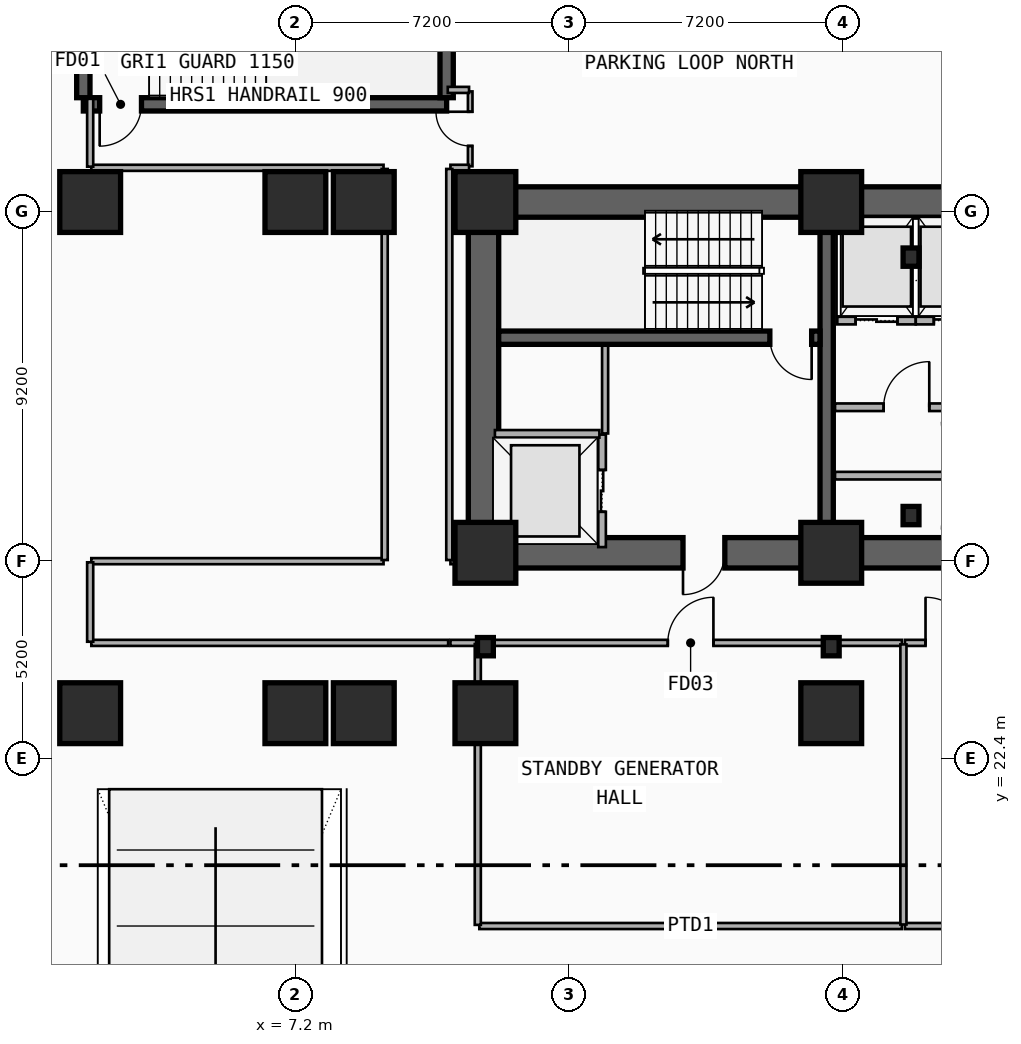
"""IFC4 building model, lengths in metres.
Left out: names, types, materials, properties, quantities, classifications, styles, units other than length and angle.
Written with IfcOpenShell. Run it as: python <this file> out.ifc"""

import sys

from ifc_helpers import new_model, si_unit, direction, frame, frame_2d, origin, origin_2d, place, context, subcontext, project, spatial, rectangle, i_section, extrude, element, fill, save


model = new_model("IFC4")
c1 = context("Model", 3, precision=1e-05, world=origin(), true_north=direction((0.0, 1.0)))
c2 = subcontext(c1, "Body", "Model", "MODEL_VIEW")
j1 = project(units=[si_unit("LENGTHUNIT", "METRE"), si_unit("PLANEANGLEUNIT", "RADIAN")], contexts=[c1])
p1 = place(None, origin())
s1 = spatial("IfcSite", under=j1, at=p1, CompositionType="ELEMENT")
p2 = place(p1, origin())
s2 = spatial("IfcBuilding", under=s1, at=p2, CompositionType="ELEMENT")
p3 = place(p2, frame((0.0, 0.0, -8.8)))
s3 = spatial("IfcBuildingStorey", under=s2, at=p3, CompositionType="ELEMENT", Elevation=-8.8)
p4 = place(p3, frame((12.15, 37.05, 0.0), z_axis=(0.0, 0.0, 1.0), x_axis=(1.0, 0.0, 0.0)))
e1 = element("IfcWall", 1, at=p4, inside=s3, PredefinedType="SHEAR", context=c2, shape_type="SweptSolid", body=[
    extrude(rectangle(XDim=33.23, YDim=0.8, at=frame_2d((16.615, 0.0))), origin(), (0.0, 0.0, 1.0), 4.4),
])
p5 = place(p3, frame((21.18, 27.82, 0.0), z_axis=(0.0, 0.0, 1.0), x_axis=(-1.0, 0.0, 0.0)))
e2 = element("IfcWall", 2, at=p5, inside=s3, PredefinedType="SHEAR", context=c2, shape_type="SweptSolid", body=[
    extrude(rectangle(XDim=9.03, YDim=0.8, at=frame_2d((4.515, 0.0))), origin(), (0.0, 0.0, 1.0), 4.4),
])
p6 = place(p5, frame((2.68, 0.0, 0.0)))
e3 = element("IfcOpeningElement", 3, at=p6, cuts=e2, PredefinedType="OPENING", context=c2, shape_type="SweptSolid", body=[
    extrude(rectangle(XDim=1.1, YDim=2.15, at=frame_2d((0.55, 1.075))), frame((0.0, 0.41, 0.0), z_axis=(0.0, -1.0, 0.0), x_axis=(1.0, 0.0, 0.0)), (0.0, 0.0, 1.0), 0.82),
])
p7 = place(p3, frame((33.15, 27.82, 0.0), z_axis=(0.0, 0.0, 1.0), x_axis=(-1.0, 0.0, 0.0)))
e4 = element("IfcWall", 4, at=p7, inside=s3, PredefinedType="SHEAR", context=c2, shape_type="SweptSolid", body=[
    extrude(rectangle(XDim=11.97, YDim=0.8, at=frame_2d((5.985, 0.0))), origin(), (0.0, 0.0, 1.0), 4.4),
])
p8 = place(p7, frame((6.1, 0.0, 0.0)))
e5 = element("IfcOpeningElement", 5, at=p8, cuts=e4, PredefinedType="OPENING", context=c2, shape_type="SweptSolid", body=[
    extrude(rectangle(XDim=1.6, YDim=2.2, at=frame_2d((0.8, 1.1))), frame((0.0, 0.41, 0.0), z_axis=(0.0, -1.0, 0.0), x_axis=(1.0, 0.0, 0.0)), (0.0, 0.0, 1.0), 0.82),
])
p9 = place(p3, frame((12.15, 28.22, 0.0), z_axis=(0.0, 0.0, 1.0), x_axis=(0.0, 1.0, 0.0)))
e6 = element("IfcWall", 6, at=p9, inside=s3, PredefinedType="SHEAR", context=c2, shape_type="SweptSolid", body=[
    extrude(rectangle(XDim=8.43, YDim=0.8, at=frame_2d((4.215, 0.0))), origin(), (0.0, 0.0, 1.0), 4.4),
])
p10 = place(p3, frame((21.18, 28.22, 0.0), z_axis=(0.0, 0.0, 1.0), x_axis=(0.0, 1.0, 0.0)))
e7 = element("IfcWall", 7, at=p10, inside=s3, PredefinedType="SHEAR", context=c2, shape_type="SweptSolid", body=[
    extrude(rectangle(XDim=8.43, YDim=0.35, at=frame_2d((4.215, 0.0))), origin(), (0.0, 0.0, 1.0), 4.4),
])
p11 = place(p3, frame((21.005, 33.48, 0.0), z_axis=(0.0, 0.0, 1.0), x_axis=(-1.0, 0.0, 0.0)))
e8 = element("IfcWall", 8, at=p11, inside=s3, PredefinedType="SHEAR", context=c2, shape_type="SweptSolid", body=[
    extrude(rectangle(XDim=8.455, YDim=0.35, at=frame_2d((4.228, 0.0))), origin(), (0.0, 0.0, 1.0), 4.4),
])
p12 = place(p11, frame((0.22, 0.0, 0.0)))
e9 = element("IfcOpeningElement", 9, at=p12, cuts=e8, PredefinedType="OPENING", context=c2, shape_type="SweptSolid", body=[
    extrude(rectangle(XDim=1.1, YDim=2.15, at=frame_2d((0.55, 1.075))), frame((0.0, 0.185, 0.0), z_axis=(0.0, -1.0, 0.0), x_axis=(1.0, 0.0, 0.0)), (0.0, 0.0, 1.0), 0.37),
])
p13 = place(p3, frame((11.18, 39.62, 0.0), z_axis=(0.0, 0.0, 1.0), x_axis=(-1.0, 0.0, 0.0)))
e10 = element("IfcWall", 10, at=p13, inside=s3, PredefinedType="SHEAR", context=c2, shape_type="SweptSolid", body=[
    extrude(rectangle(XDim=9.56, YDim=0.35, at=frame_2d((4.78, 0.0))), origin(), (0.0, 0.0, 1.0), 4.4),
])
p14 = place(p13, frame((8.03, 0.0, 0.0)))
e11 = element("IfcOpeningElement", 11, at=p14, cuts=e10, PredefinedType="OPENING", context=c2, shape_type="SweptSolid", body=[
    extrude(rectangle(XDim=1.1, YDim=2.15, at=frame_2d((0.55, 1.075))), frame((0.0, 0.185, 0.0), z_axis=(0.0, -1.0, 0.0), x_axis=(1.0, 0.0, 0.0)), (0.0, 0.0, 1.0), 0.37),
])
for number, where, z_axis, x_axis in (
    (12, (1.62, 39.795, 0.0), (0.0, 0.0, 1.0), (0.0, 1.0, 0.0)),
    (13, (11.18, 39.795, 0.0), (0.0, 0.0, 1.0), (0.0, 1.0, 0.0)),
):
    element("IfcWall", number, at=place(p3, frame(where, z_axis=z_axis, x_axis=x_axis)), inside=s3, PredefinedType="SHEAR", context=c2, shape_type="SweptSolid", body=[
        extrude(rectangle(XDim=3.27, YDim=0.35, at=frame_2d((1.635, 0.0))), origin(), (0.0, 0.0, 1.0), 4.4),
    ])
for number, where, z_axis, x_axis in (
    (14, (23.4, 28.8, 0.0), (0.0, 0.0, 1.0), (1.0, 0.0, 0.0)),
    (15, (23.4, 35.6, 0.0), (0.0, 0.0, 1.0), (1.0, 0.0, 0.0)),
):
    element("IfcColumn", number, at=place(p3, frame(where, z_axis=z_axis, x_axis=x_axis)), inside=s3, PredefinedType="COLUMN", context=c2, shape_type="SweptSolid", body=[
        extrude(i_section(OverallWidth=0.418, OverallDepth=0.481, WebThickness=0.043, FlangeThickness=0.068, FilletRadius=0.015, at=origin_2d()), origin(), (0.0, 0.0, 1.0), 4.4),
    ])
for number, where, z_axis, x_axis in (
    (16, (12.2, 27.82, 0.0), (0.0, 0.0, 1.0), (1.0, 0.0, 0.0)),
    (17, (12.2, 37.05, 0.0), (0.0, 0.0, 1.0), (1.0, 0.0, 0.0)),
    (18, (21.3, 27.82, 0.0), (0.0, 0.0, 1.0), (1.0, 0.0, 0.0)),
    (19, (21.3, 37.05, 0.0), (0.0, 0.0, 1.0), (1.0, 0.0, 0.0)),
):
    element("IfcColumn", number, at=place(p3, frame(where, z_axis=z_axis, x_axis=x_axis)), inside=s3, PredefinedType="COLUMN", context=c2, shape_type="SweptSolid", body=[
        extrude(rectangle(XDim=1.6, YDim=1.6, at=origin_2d()), origin(), (0.0, 0.0, 1.0), 4.4),
    ])
for number, where, z_axis, x_axis in (
    (20, (12.2, 25.35, 0.0), (0.0, 0.0, 1.0), (1.0, 0.0, 0.0)),
    (21, (21.3, 25.35, 0.0), (0.0, 0.0, 1.0), (1.0, 0.0, 0.0)),
):
    element("IfcColumn", number, at=place(p3, frame(where, z_axis=z_axis, x_axis=x_axis)), inside=s3, PredefinedType="COLUMN", context=c2, shape_type="SweptSolid", body=[
        extrude(i_section(OverallWidth=0.418, OverallDepth=0.481, WebThickness=0.043, FlangeThickness=0.068, FilletRadius=0.015, at=origin_2d()), origin(), (0.0, 0.0, 1.0), 4.4),
    ])
for number, where, z_axis, x_axis in (
    (22, (1.8, 23.6, 0.0), (0.0, 0.0, 1.0), (1.0, 0.0, 0.0)),
    (23, (1.8, 37.05, 0.0), (0.0, 0.0, 1.0), (1.0, 0.0, 0.0)),
    (24, (7.2, 23.6, 0.0), (0.0, 0.0, 1.0), (1.0, 0.0, 0.0)),
    (25, (7.2, 37.05, 0.0), (0.0, 0.0, 1.0), (1.0, 0.0, 0.0)),
    (26, (9.0, 23.6, 0.0), (0.0, 0.0, 1.0), (1.0, 0.0, 0.0)),
    (27, (9.0, 37.05, 0.0), (0.0, 0.0, 1.0), (1.0, 0.0, 0.0)),
    (28, (12.2, 23.6, 0.0), (0.0, 0.0, 1.0), (1.0, 0.0, 0.0)),
    (29, (21.3, 23.6, 0.0), (0.0, 0.0, 1.0), (1.0, 0.0, 0.0)),
):
    element("IfcColumn", number, at=place(p3, frame(where, z_axis=z_axis, x_axis=x_axis)), inside=s3, PredefinedType="COLUMN", context=c2, shape_type="SweptSolid", body=[
        extrude(rectangle(XDim=1.6, YDim=1.6, at=origin_2d()), origin(), (0.0, 0.0, 1.0), 4.4),
    ])
p15 = place(p3, frame((15.27, 27.97, 0.0), z_axis=(0.0, 0.0, 1.0), x_axis=(0.0, 1.0, 0.0)))
e30 = element("IfcWall", 30, at=p15, inside=s3, PredefinedType="PARTITIONING", context=c2, shape_type="SweptSolid", body=[
    extrude(rectangle(XDim=2.96, YDim=0.2, at=frame_2d((1.48, 0.0))), origin(), (0.0, 0.0, 1.0), 3.052),
])
p16 = place(p15, frame((0.93, 0.0, 0.0)))
e31 = element("IfcOpeningElement", 31, at=p16, cuts=e30, PredefinedType="OPENING", context=c2, shape_type="SweptSolid", body=[
    extrude(rectangle(XDim=1.1, YDim=2.15, at=frame_2d((0.55, 1.075))), frame((0.0, 0.11, 0.0), z_axis=(0.0, -1.0, 0.0), x_axis=(1.0, 0.0, 0.0)), (0.0, 0.0, 1.0), 0.22),
])
p17 = place(p3, frame((12.45, 30.95, 0.0), z_axis=(0.0, 0.0, 1.0), x_axis=(1.0, 0.0, 0.0)))
e32 = element("IfcWall", 32, at=p17, inside=s3, PredefinedType="PARTITIONING", context=c2, shape_type="SweptSolid", body=[
    extrude(rectangle(XDim=2.75, YDim=0.2, at=frame_2d((1.375, 0.0))), origin(), (0.0, 0.0, 1.0), 3.052),
])
p18 = place(p3, frame((21.46, 33.93, 0.0), z_axis=(0.0, 0.0, 1.0), x_axis=(1.0, 0.0, 0.0)))
e33 = element("IfcWall", 33, at=p18, inside=s3, PredefinedType="PARTITIONING", context=c2, shape_type="SweptSolid", body=[
    extrude(rectangle(XDim=2.065, YDim=0.2, at=frame_2d((1.032, 0.0))), origin(), (0.0, 0.0, 1.0), 3.052),
])
p19 = place(p18, frame((0.482, 0.0, 0.0)))
e34 = element("IfcOpeningElement", 34, at=p19, cuts=e33, PredefinedType="OPENING", context=c2, shape_type="SweptSolid", body=[
    extrude(rectangle(XDim=1.1, YDim=2.15, at=frame_2d((0.55, 1.075))), frame((0.0, 0.11, 0.0), z_axis=(0.0, -1.0, 0.0), x_axis=(1.0, 0.0, 0.0)), (0.0, 0.0, 1.0), 0.22),
])
p20 = place(p3, frame((23.525, 33.93, 0.0), z_axis=(0.0, 0.0, 1.0), x_axis=(1.0, 0.0, 0.0)))
e35 = element("IfcWall", 35, at=p20, inside=s3, PredefinedType="PARTITIONING", context=c2, shape_type="SweptSolid", body=[
    extrude(rectangle(XDim=2.05, YDim=0.2, at=frame_2d((1.025, 0.0))), origin(), (0.0, 0.0, 1.0), 4.08),
])
p21 = place(p20, frame((0.475, 0.0, 0.0)))
e36 = element("IfcOpeningElement", 36, at=p21, cuts=e35, PredefinedType="OPENING", context=c2, shape_type="SweptSolid", body=[
    extrude(rectangle(XDim=1.1, YDim=2.15, at=frame_2d((0.55, 1.075))), frame((0.0, 0.11, 0.0), z_axis=(0.0, -1.0, 0.0), x_axis=(1.0, 0.0, 0.0)), (0.0, 0.0, 1.0), 0.22),
])
p22 = place(p3, frame((21.4, 31.65, 0.0), z_axis=(0.0, 0.0, 1.0), x_axis=(1.0, 0.0, 0.0)))
e37 = element("IfcWall", 37, at=p22, inside=s3, PredefinedType="PARTITIONING", context=c2, shape_type="SweptSolid", body=[
    extrude(rectangle(XDim=3.76, YDim=0.2, at=frame_2d((1.88, 0.0))), origin(), (0.0, 0.0, 1.0), 3.052),
])
p23 = place(p22, frame((1.28, 0.0, 0.0)))
e38 = element("IfcOpeningElement", 38, at=p23, cuts=e37, PredefinedType="OPENING", context=c2, shape_type="SweptSolid", body=[
    extrude(rectangle(XDim=1.2, YDim=2.15, at=frame_2d((0.6, 1.075))), frame((0.0, 0.11, 0.0), z_axis=(0.0, -1.0, 0.0), x_axis=(1.0, 0.0, 0.0)), (0.0, 0.0, 1.0), 0.22),
])
p24 = place(p3, frame((21.4, 29.85, 0.0), z_axis=(0.0, 0.0, 1.0), x_axis=(1.0, 0.0, 0.0)))
e39 = element("IfcWall", 39, at=p24, inside=s3, PredefinedType="PARTITIONING", context=c2, shape_type="SweptSolid", body=[
    extrude(rectangle(XDim=3.76, YDim=0.2, at=frame_2d((1.88, 0.0))), origin(), (0.0, 0.0, 1.0), 3.052),
])
p25 = place(p3, frame((12.04, 25.45, 0.0), z_axis=(0.0, 0.0, 1.0), x_axis=(1.0, 0.0, 0.0)))
e40 = element("IfcWall", 40, at=p25, inside=s3, PredefinedType="PARTITIONING", context=c2, shape_type="SweptSolid", body=[
    extrude(rectangle(XDim=11.12, YDim=0.16, at=frame_2d((5.56, 0.0))), origin(), (0.0, 0.0, 1.0), 3.246),
])
p26 = place(p25, frame((4.96, 0.0, 0.0)))
e41 = element("IfcOpeningElement", 41, at=p26, cuts=e40, PredefinedType="OPENING", context=c2, shape_type="SweptSolid", body=[
    extrude(rectangle(XDim=1.2, YDim=2.15, at=frame_2d((0.6, 1.075))), frame((0.0, 0.09, 0.0), z_axis=(0.0, -1.0, 0.0), x_axis=(1.0, 0.0, 0.0)), (0.0, 0.0, 1.0), 0.18),
])
p27 = place(p3, frame((23.24, 25.45, 0.0), z_axis=(0.0, 0.0, 1.0), x_axis=(1.0, 0.0, 0.0)))
e42 = element("IfcWall", 42, at=p27, inside=s3, PredefinedType="PARTITIONING", context=c2, shape_type="SweptSolid", body=[
    extrude(rectangle(XDim=11.12, YDim=0.16, at=frame_2d((5.56, 0.0))), origin(), (0.0, 0.0, 1.0), 4.08),
])
p28 = place(p27, frame((0.542, 0.0, 0.0)))
e43 = element("IfcOpeningElement", 43, at=p28, cuts=e42, PredefinedType="OPENING", context=c2, shape_type="SweptSolid", body=[
    extrude(rectangle(XDim=1.2, YDim=2.15, at=frame_2d((0.6, 1.075))), frame((0.0, 0.09, 0.0), z_axis=(0.0, -1.0, 0.0), x_axis=(1.0, 0.0, 0.0)), (0.0, 0.0, 1.0), 0.18),
])
p29 = place(p3, frame((12.04, 18.0, 0.0), z_axis=(0.0, 0.0, 1.0), x_axis=(1.0, 0.0, 0.0)))
e44 = element("IfcWall", 44, at=p29, inside=s3, PredefinedType="PARTITIONING", context=c2, shape_type="SweptSolid", body=[
    extrude(rectangle(XDim=11.12, YDim=0.16, at=frame_2d((5.56, 0.0))), origin(), (0.0, 0.0, 1.0), 3.246),
])
p30 = place(p3, frame((23.24, 18.0, 0.0), z_axis=(0.0, 0.0, 1.0), x_axis=(1.0, 0.0, 0.0)))
e45 = element("IfcWall", 45, at=p30, inside=s3, PredefinedType="PARTITIONING", context=c2, shape_type="SweptSolid", body=[
    extrude(rectangle(XDim=11.12, YDim=0.16, at=frame_2d((5.56, 0.0))), origin(), (0.0, 0.0, 1.0), 4.08),
])
p31 = place(p3, frame((11.8, 37.99, 0.0), z_axis=(0.0, 0.0, 1.0), x_axis=(0.0, 1.0, 0.0)))
e46 = element("IfcWall", 46, at=p31, inside=s3, PredefinedType="PARTITIONING", context=c2, shape_type="SweptSolid", body=[
    extrude(rectangle(XDim=1.97, YDim=0.12, at=frame_2d((0.985, 0.0))), origin(), (0.0, 0.0, 1.0), 3.41),
])
p32 = place(p31, frame((0.535, 0.0, 0.0)))
e47 = element("IfcOpeningElement", 47, at=p32, cuts=e46, PredefinedType="OPENING", context=c2, shape_type="SweptSolid", body=[
    extrude(rectangle(XDim=0.9, YDim=2.1, at=frame_2d((0.45, 1.05))), frame((0.0, 0.07, 0.0), z_axis=(0.0, -1.0, 0.0), x_axis=(1.0, 0.0, 0.0)), (0.0, 0.0, 1.0), 0.14),
])
p33 = place(p3, frame((23.2, 18.04, 0.0), z_axis=(0.0, 0.0, 1.0), x_axis=(0.0, 1.0, 0.0)))
e48 = element("IfcWall", 48, at=p33, inside=s3, PredefinedType="PARTITIONING", context=c2, shape_type="SweptSolid", body=[
    extrude(rectangle(XDim=7.37, YDim=0.16, at=frame_2d((3.685, 0.0))), origin(), (0.0, 0.0, 1.0), 2.66),
])
p34 = place(p3, frame((15.35, 30.96, 0.0), z_axis=(0.0, 0.0, 1.0), x_axis=(0.0, 1.0, 0.0)))
e49 = element("IfcWall", 49, at=p34, inside=s3, PredefinedType="PARTITIONING", context=c2, shape_type="SweptSolid", body=[
    extrude(rectangle(XDim=2.31, YDim=0.16, at=frame_2d((1.155, 0.0))), origin(), (0.0, 0.0, 1.0), 4.08),
])
p35 = place(p3, frame((11.28, 25.45, 0.0), z_axis=(0.0, 0.0, 1.0), x_axis=(1.0, 0.0, 0.0)))
e50 = element("IfcWall", 50, at=p35, inside=s3, PredefinedType="PARTITIONING", context=c2, shape_type="SweptSolid", body=[
    extrude(rectangle(XDim=0.69, YDim=0.16, at=frame_2d((0.345, 0.0))), origin(), (0.0, 0.0, 1.0), 3.246),
])
p36 = place(p3, frame((11.28, 27.6, 0.0), z_axis=(0.0, 0.0, 1.0), x_axis=(1.0, 0.0, 0.0)))
e51 = element("IfcWall", 51, at=p36, inside=s3, PredefinedType="PARTITIONING", context=c2, shape_type="SweptSolid", body=[
    extrude(rectangle(XDim=0.84, YDim=0.16, at=frame_2d((0.42, 0.0))), origin(), (0.0, 0.0, 1.0), 3.052),
])
p37 = place(p3, frame((1.83, 25.45, 0.0), z_axis=(0.0, 0.0, 1.0), x_axis=(1.0, 0.0, 0.0)))
e52 = element("IfcWall", 52, at=p37, inside=s3, PredefinedType="PARTITIONING", context=c2, shape_type="SweptSolid", body=[
    extrude(rectangle(XDim=9.39, YDim=0.16, at=frame_2d((4.695, 0.0))), origin(), (0.0, 0.0, 1.0), 4.08),
])
p38 = place(p3, frame((1.83, 27.6, 0.0), z_axis=(0.0, 0.0, 1.0), x_axis=(1.0, 0.0, 0.0)))
e53 = element("IfcWall", 53, at=p38, inside=s3, PredefinedType="PARTITIONING", context=c2, shape_type="SweptSolid", body=[
    extrude(rectangle(XDim=7.69, YDim=0.16, at=frame_2d((3.845, 0.0))), origin(), (0.0, 0.0, 1.0), 4.08),
])
p39 = place(p3, frame((1.8, 25.48, 0.0), z_axis=(0.0, 0.0, 1.0), x_axis=(0.0, 1.0, 0.0)))
e54 = element("IfcWall", 54, at=p39, inside=s3, PredefinedType="PARTITIONING", context=c2, shape_type="SweptSolid", body=[
    extrude(rectangle(XDim=2.09, YDim=0.16, at=frame_2d((1.045, 0.0))), origin(), (0.0, 0.0, 1.0), 4.08),
])
p40 = place(p3, frame((1.83, 37.95, 0.0), z_axis=(0.0, 0.0, 1.0), x_axis=(1.0, 0.0, 0.0)))
e55 = element("IfcWall", 55, at=p40, inside=s3, PredefinedType="PARTITIONING", context=c2, shape_type="SweptSolid", body=[
    extrude(rectangle(XDim=7.69, YDim=0.16, at=frame_2d((3.845, 0.0))), origin(), (0.0, 0.0, 1.0), 4.08),
])
p41 = place(p3, frame((11.28, 37.95, 0.0), z_axis=(0.0, 0.0, 1.0), x_axis=(1.0, 0.0, 0.0)))
e56 = element("IfcWall", 56, at=p41, inside=s3, PredefinedType="PARTITIONING", context=c2, shape_type="SweptSolid", body=[
    extrude(rectangle(XDim=0.49, YDim=0.16, at=frame_2d((0.245, 0.0))), origin(), (0.0, 0.0, 1.0), 3.41),
])
p42 = place(p3, frame((11.21, 40.0, 0.0), z_axis=(0.0, 0.0, 1.0), x_axis=(1.0, 0.0, 0.0)))
e57 = element("IfcWall", 57, at=p42, inside=s3, PredefinedType="PARTITIONING", context=c2, shape_type="SweptSolid", body=[
    extrude(rectangle(XDim=0.56, YDim=0.16, at=frame_2d((0.28, 0.0))), origin(), (0.0, 0.0, 1.0), 3.41),
])
p43 = place(p3, frame((1.8, 37.98, 0.0), z_axis=(0.0, 0.0, 1.0), x_axis=(0.0, 1.0, 0.0)))
e58 = element("IfcWall", 58, at=p43, inside=s3, PredefinedType="PARTITIONING", context=c2, shape_type="SweptSolid", body=[
    extrude(rectangle(XDim=1.785, YDim=0.16, at=frame_2d((0.893, 0.0))), origin(), (0.0, 0.0, 1.0), 4.08),
])
for number, where, z_axis, x_axis in (
    (59, (9.55, 27.63, 0.0), (0.0, 0.0, 1.0), (0.0, 1.0, 0.0)),
    (60, (11.25, 27.63, 0.0), (0.0, 0.0, 1.0), (0.0, 1.0, 0.0)),
):
    element("IfcWall", number, at=place(p3, frame(where, z_axis=z_axis, x_axis=x_axis)), inside=s3, PredefinedType="PARTITIONING", context=c2, shape_type="SweptSolid", body=[
        extrude(rectangle(XDim=10.29, YDim=0.16, at=frame_2d((5.145, 0.0))), origin(), (0.0, 0.0, 1.0), 4.08),
    ])
p44 = place(p3, frame((12.0, 18.03, 0.0), z_axis=(0.0, 0.0, 1.0), x_axis=(0.0, 1.0, 0.0)))
e61 = element("IfcWall", 61, at=p44, inside=s3, PredefinedType="PARTITIONING", context=c2, shape_type="SweptSolid", body=[
    extrude(rectangle(XDim=7.39, YDim=0.16, at=frame_2d((3.695, 0.0))), origin(), (0.0, 0.0, 1.0), 2.66),
])
p45 = place(p16, origin())
e62 = element("IfcDoor", 62, at=p45, inside=s3, OperationType="DOUBLE_DOOR_SLIDING", PredefinedType="DOOR", context=c2, shape_type="SweptSolid", body=[
    extrude(rectangle(XDim=1.1, YDim=2.15, at=frame_2d((0.55, 1.075))), frame((0.0, 0.025, 0.0), z_axis=(0.0, -1.0, 0.0), x_axis=(1.0, 0.0, 0.0)), (0.0, 0.0, 1.0), 0.05),
])
fill(e31, e62)
p46 = place(p19, origin())
e63 = element("IfcDoor", 63, at=p46, inside=s3, OperationType="DOUBLE_DOOR_SLIDING", PredefinedType="DOOR", context=c2, shape_type="SweptSolid", body=[
    extrude(rectangle(XDim=1.1, YDim=2.15, at=frame_2d((0.55, 1.075))), frame((0.0, 0.025, 0.0), z_axis=(0.0, -1.0, 0.0), x_axis=(1.0, 0.0, 0.0)), (0.0, 0.0, 1.0), 0.05),
])
fill(e34, e63)
p47 = place(p21, origin())
e64 = element("IfcDoor", 64, at=p47, inside=s3, OperationType="DOUBLE_DOOR_SLIDING", PredefinedType="DOOR", context=c2, shape_type="SweptSolid", body=[
    extrude(rectangle(XDim=1.1, YDim=2.15, at=frame_2d((0.55, 1.075))), frame((0.0, 0.025, 0.0), z_axis=(0.0, -1.0, 0.0), x_axis=(1.0, 0.0, 0.0)), (0.0, 0.0, 1.0), 0.05),
])
fill(e36, e64)
p48 = place(p12, origin())
e65 = element("IfcDoor", 65, at=p48, inside=s3, OperationType="SINGLE_SWING_LEFT", PredefinedType="DOOR", context=c2, shape_type="SweptSolid", body=[
    extrude(rectangle(XDim=1.1, YDim=2.15, at=frame_2d((0.55, 1.075))), frame((0.0, 0.025, 0.0), z_axis=(0.0, -1.0, 0.0), x_axis=(1.0, 0.0, 0.0)), (0.0, 0.0, 1.0), 0.05),
])
fill(e9, e65)
p49 = place(p6, origin())
e66 = element("IfcDoor", 66, at=p49, inside=s3, OperationType="SINGLE_SWING_RIGHT", PredefinedType="DOOR", context=c2, shape_type="SweptSolid", body=[
    extrude(rectangle(XDim=1.1, YDim=2.15, at=frame_2d((0.55, 1.075))), frame((0.0, 0.025, 0.0), z_axis=(0.0, -1.0, 0.0), x_axis=(1.0, 0.0, 0.0)), (0.0, 0.0, 1.0), 0.05),
])
fill(e3, e66)
p50 = place(p14, origin())
e67 = element("IfcDoor", 67, at=p50, inside=s3, OperationType="SINGLE_SWING_RIGHT", PredefinedType="DOOR", context=c2, shape_type="SweptSolid", body=[
    extrude(rectangle(XDim=1.1, YDim=2.15, at=frame_2d((0.55, 1.075))), frame((0.0, 0.025, 0.0), z_axis=(0.0, -1.0, 0.0), x_axis=(1.0, 0.0, 0.0)), (0.0, 0.0, 1.0), 0.05),
])
fill(e11, e67)
p51 = place(p23, origin())
e68 = element("IfcDoor", 68, at=p51, inside=s3, OperationType="SINGLE_SWING_RIGHT", PredefinedType="DOOR", context=c2, shape_type="SweptSolid", body=[
    extrude(rectangle(XDim=1.2, YDim=2.15, at=frame_2d((0.6, 1.075))), frame((0.0, 0.025, 0.0), z_axis=(0.0, -1.0, 0.0), x_axis=(1.0, 0.0, 0.0)), (0.0, 0.0, 1.0), 0.05),
])
fill(e38, e68)
p52 = place(p26, origin())
e69 = element("IfcDoor", 69, at=p52, inside=s3, OperationType="SINGLE_SWING_RIGHT", PredefinedType="DOOR", context=c2, shape_type="SweptSolid", body=[
    extrude(rectangle(XDim=1.2, YDim=2.15, at=frame_2d((0.6, 1.075))), frame((0.0, 0.025, 0.0), z_axis=(0.0, -1.0, 0.0), x_axis=(1.0, 0.0, 0.0)), (0.0, 0.0, 1.0), 0.05),
])
fill(e41, e69)
p53 = place(p28, origin())
e70 = element("IfcDoor", 70, at=p53, inside=s3, OperationType="SINGLE_SWING_LEFT", PredefinedType="DOOR", context=c2, shape_type="SweptSolid", body=[
    extrude(rectangle(XDim=1.2, YDim=2.15, at=frame_2d((0.6, 1.075))), frame((0.0, 0.025, 0.0), z_axis=(0.0, -1.0, 0.0), x_axis=(1.0, 0.0, 0.0)), (0.0, 0.0, 1.0), 0.05),
])
fill(e43, e70)
p54 = place(p32, origin())
e71 = element("IfcDoor", 71, at=p54, inside=s3, OperationType="SINGLE_SWING_RIGHT", PredefinedType="DOOR", context=c2, shape_type="SweptSolid", body=[
    extrude(rectangle(XDim=0.9, YDim=2.1, at=frame_2d((0.45, 1.05))), frame((0.0, 0.025, 0.0), z_axis=(0.0, -1.0, 0.0), x_axis=(1.0, 0.0, 0.0)), (0.0, 0.0, 1.0), 0.05),
])
fill(e47, e71)
save(model, sys.argv[1])
